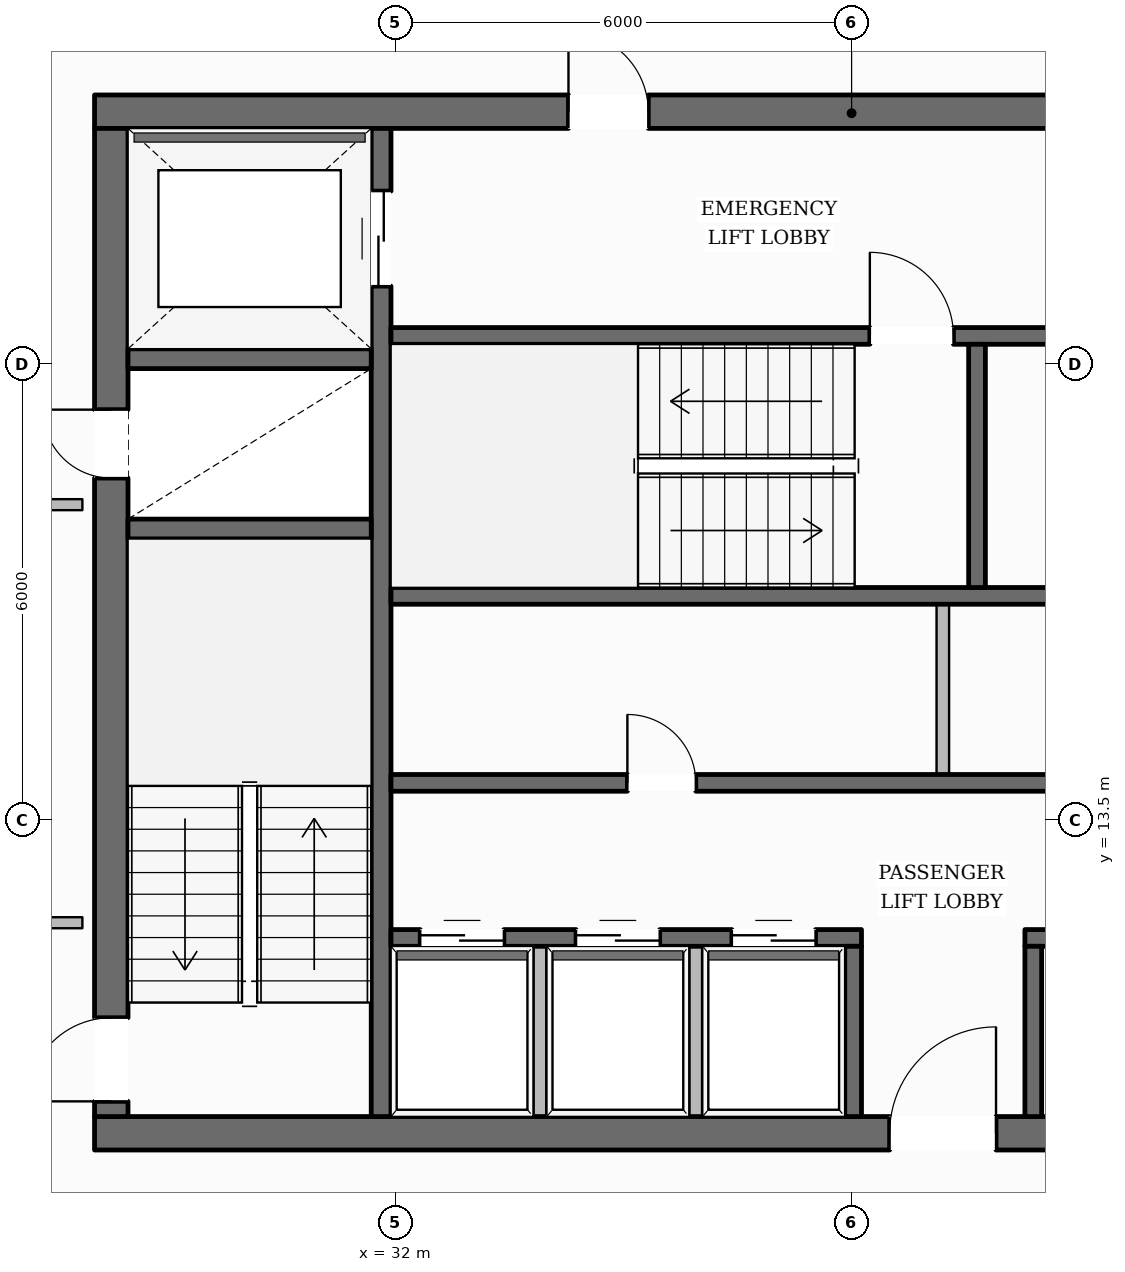
"""IFC4 building model, lengths in metres.
Left out: names, types, materials, properties, quantities, classifications, styles, units other than length and angle.
Written with IfcOpenShell. Run it as: python <this file> out.ifc"""

import sys

from ifc_helpers import new_model, si_unit, direction, frame, frame_2d, origin, place, context, subcontext, project, spatial, rectangle, extrude, element, fill, save


model = new_model("IFC4")
c1 = context("Model", 3, precision=1e-05, world=origin(), true_north=direction((0.0, 1.0)))
c2 = subcontext(c1, "Body", "Model", "MODEL_VIEW")
j1 = project(units=[si_unit("LENGTHUNIT", "METRE"), si_unit("PLANEANGLEUNIT", "RADIAN")], contexts=[c1])
p1 = place(None, origin())
s1 = spatial("IfcSite", under=j1, at=p1, CompositionType="ELEMENT")
p2 = place(p1, origin())
s2 = spatial("IfcBuilding", under=s1, at=p2, CompositionType="ELEMENT")
p3 = place(p2, frame((0.0, 0.0, 211.2)))
s3 = spatial("IfcBuildingStorey", under=s2, at=p3, CompositionType="ELEMENT", Elevation=211.2)
p4 = place(p3, frame((28.04, 9.38, 0.0), z_axis=(0.0, 0.0, 1.0), x_axis=(1.0, 0.0, 0.0)))
e1 = element("IfcWall", 1, at=p4, inside=s3, PredefinedType="SOLIDWALL", context=c2, shape_type="SweptSolid", body=[
    extrude(rectangle(XDim=19.92, YDim=0.44, at=frame_2d((9.96, 0.0))), origin(), (0.0, 0.0, 1.0), 3.6),
])
p5 = place(p4, frame((10.46, 0.0, 0.0)))
e2 = element("IfcOpeningElement", 2, at=p5, cuts=e1, PredefinedType="OPENING", context=c2, shape_type="SweptSolid", body=[
    extrude(rectangle(XDim=1.4, YDim=2.2, at=frame_2d((0.7, 1.1))), frame((0.0, 0.23, 0.0), z_axis=(0.0, -1.0, 0.0), x_axis=(1.0, 0.0, 0.0)), (0.0, 0.0, 1.0), 0.46),
])
p6 = place(p3, frame((28.04, 22.82, 0.0), z_axis=(0.0, 0.0, 1.0), x_axis=(1.0, 0.0, 0.0)))
e3 = element("IfcWall", 3, at=p6, inside=s3, PredefinedType="SOLIDWALL", context=c2, shape_type="SweptSolid", body=[
    extrude(rectangle(XDim=19.92, YDim=0.44, at=frame_2d((9.96, 0.0))), origin(), (0.0, 0.0, 1.0), 3.6),
])
p7 = place(p6, frame((6.235, 0.0, 0.0)))
e4 = element("IfcOpeningElement", 4, at=p7, cuts=e3, PredefinedType="OPENING", context=c2, shape_type="SweptSolid", body=[
    extrude(rectangle(XDim=1.05, YDim=2.15, at=frame_2d((0.525, 1.075))), frame((0.0, 0.23, 0.0), z_axis=(0.0, -1.0, 0.0), x_axis=(1.0, 0.0, 0.0)), (0.0, 0.0, 1.0), 0.46),
])
p8 = place(p6, frame((12.635, 0.0, 0.0)))
e5 = element("IfcOpeningElement", 5, at=p8, cuts=e3, PredefinedType="OPENING", context=c2, shape_type="SweptSolid", body=[
    extrude(rectangle(XDim=1.05, YDim=2.15, at=frame_2d((0.525, 1.075))), frame((0.0, 0.23, 0.0), z_axis=(0.0, -1.0, 0.0), x_axis=(1.0, 0.0, 0.0)), (0.0, 0.0, 1.0), 0.46),
])
p9 = place(p3, frame((28.26, 9.6, 0.0), z_axis=(0.0, 0.0, 1.0), x_axis=(0.0, 1.0, 0.0)))
e6 = element("IfcWall", 6, at=p9, inside=s3, PredefinedType="SOLIDWALL", context=c2, shape_type="SweptSolid", body=[
    extrude(rectangle(XDim=13.0, YDim=0.44, at=frame_2d((6.5, 0.0))), origin(), (0.0, 0.0, 1.0), 3.6),
])
p10 = place(p9, frame((0.2, 0.0, 0.0)))
e7 = element("IfcOpeningElement", 7, at=p10, cuts=e6, PredefinedType="OPENING", context=c2, shape_type="SweptSolid", body=[
    extrude(rectangle(XDim=1.1, YDim=2.15, at=frame_2d((0.55, 1.075))), frame((0.0, 0.23, 0.0), z_axis=(0.0, -1.0, 0.0), x_axis=(1.0, 0.0, 0.0)), (0.0, 0.0, 1.0), 0.46),
])
p11 = place(p9, frame((8.4, 0.0, 0.0)))
e8 = element("IfcOpeningElement", 8, at=p11, cuts=e6, PredefinedType="OPENING", context=c2, shape_type="SweptSolid", body=[
    extrude(rectangle(XDim=0.9, YDim=2.1, at=frame_2d((0.45, 1.05))), frame((0.0, 0.23, 0.0), z_axis=(0.0, -1.0, 0.0), x_axis=(1.0, 0.0, 0.0)), (0.0, 0.0, 1.0), 0.46),
])
p12 = place(p3, frame((31.81, 9.6, 0.0), z_axis=(0.0, 0.0, 1.0), x_axis=(0.0, 1.0, 0.0)))
e9 = element("IfcWall", 9, at=p12, inside=s3, PredefinedType="SHEAR", context=c2, shape_type="SweptSolid", body=[
    extrude(rectangle(XDim=13.0, YDim=0.26, at=frame_2d((6.5, 0.0))), origin(), (0.0, 0.0, 1.0), 3.6),
])
p13 = place(p12, frame((10.925, 0.0, 0.0)))
e10 = element("IfcOpeningElement", 10, at=p13, cuts=e9, PredefinedType="OPENING", context=c2, shape_type="SweptSolid", body=[
    extrude(rectangle(XDim=1.25, YDim=2.25, at=frame_2d((0.625, 1.125))), frame((0.0, 0.14, 0.0), z_axis=(0.0, -1.0, 0.0), x_axis=(1.0, 0.0, 0.0)), (0.0, 0.0, 1.0), 0.28),
])
for number, where, z_axis, x_axis in (
    (11, (28.48, 17.33, 0.0), (0.0, 0.0, 1.0), (1.0, 0.0, 0.0)),
    (12, (28.48, 19.57, 0.0), (0.0, 0.0, 1.0), (1.0, 0.0, 0.0)),
):
    element("IfcWall", number, at=place(p3, frame(where, z_axis=z_axis, x_axis=x_axis)), inside=s3, PredefinedType="SHEAR", context=c2, shape_type="SweptSolid", body=[
        extrude(rectangle(XDim=3.2, YDim=0.26, at=frame_2d((1.6, 0.0))), origin(), (0.0, 0.0, 1.0), 3.6),
    ])
p14 = place(p3, frame((31.94, 19.87, 0.0), z_axis=(0.0, 0.0, 1.0), x_axis=(1.0, 0.0, 0.0)))
e13 = element("IfcWall", 13, at=p14, inside=s3, PredefinedType="SOLIDWALL", context=c2, shape_type="SweptSolid", body=[
    extrude(rectangle(XDim=12.12, YDim=0.22, at=frame_2d((6.06, 0.0))), origin(), (0.0, 0.0, 1.0), 3.6),
])
p15 = place(p14, frame((6.3, 0.0, 0.0)))
e14 = element("IfcOpeningElement", 14, at=p15, cuts=e13, PredefinedType="OPENING", context=c2, shape_type="SweptSolid", body=[
    extrude(rectangle(XDim=1.1, YDim=2.15, at=frame_2d((0.55, 1.075))), frame((0.0, 0.12, 0.0), z_axis=(0.0, -1.0, 0.0), x_axis=(1.0, 0.0, 0.0)), (0.0, 0.0, 1.0), 0.24),
])
p16 = place(p14, frame((9.51, 0.0, 0.0)))
e15 = element("IfcOpeningElement", 15, at=p16, cuts=e13, PredefinedType="OPENING", context=c2, shape_type="SweptSolid", body=[
    extrude(rectangle(XDim=0.9, YDim=2.1, at=frame_2d((0.45, 1.05))), frame((0.0, 0.12, 0.0), z_axis=(0.0, -1.0, 0.0), x_axis=(1.0, 0.0, 0.0)), (0.0, 0.0, 1.0), 0.24),
])
p17 = place(p3, frame((31.94, 16.45, 0.0), z_axis=(0.0, 0.0, 1.0), x_axis=(1.0, 0.0, 0.0)))
e16 = element("IfcWall", 16, at=p17, inside=s3, PredefinedType="SOLIDWALL", context=c2, shape_type="SweptSolid", body=[
    extrude(rectangle(XDim=12.12, YDim=0.22, at=frame_2d((6.06, 0.0))), origin(), (0.0, 0.0, 1.0), 3.6),
])
p18 = place(p3, frame((39.65, 16.56, 0.0), z_axis=(0.0, 0.0, 1.0), x_axis=(0.0, 1.0, 0.0)))
e17 = element("IfcWall", 17, at=p18, inside=s3, PredefinedType="SOLIDWALL", context=c2, shape_type="SweptSolid", body=[
    extrude(rectangle(XDim=3.2, YDim=0.22, at=frame_2d((1.6, 0.0))), origin(), (0.0, 0.0, 1.0), 3.6),
])
p19 = place(p3, frame((31.94, 13.99, 0.0), z_axis=(0.0, 0.0, 1.0), x_axis=(1.0, 0.0, 0.0)))
e18 = element("IfcWall", 18, at=p19, inside=s3, PredefinedType="SOLIDWALL", context=c2, shape_type="SweptSolid", body=[
    extrude(rectangle(XDim=12.12, YDim=0.22, at=frame_2d((6.06, 0.0))), origin(), (0.0, 0.0, 1.0), 3.6),
])
p20 = place(p19, frame((3.11, 0.0, 0.0)))
e19 = element("IfcOpeningElement", 19, at=p20, cuts=e18, PredefinedType="OPENING", context=c2, shape_type="SweptSolid", body=[
    extrude(rectangle(XDim=0.9, YDim=2.1, at=frame_2d((0.45, 1.05))), frame((0.0, 0.12, 0.0), z_axis=(0.0, -1.0, 0.0), x_axis=(1.0, 0.0, 0.0)), (0.0, 0.0, 1.0), 0.24),
])
p21 = place(p19, frame((9.21, 0.0, 0.0)))
e20 = element("IfcOpeningElement", 20, at=p21, cuts=e18, PredefinedType="OPENING", context=c2, shape_type="SweptSolid", body=[
    extrude(rectangle(XDim=0.9, YDim=2.1, at=frame_2d((0.45, 1.05))), frame((0.0, 0.12, 0.0), z_axis=(0.0, -1.0, 0.0), x_axis=(1.0, 0.0, 0.0)), (0.0, 0.0, 1.0), 0.24),
])
p22 = place(p3, frame((31.94, 11.95, 0.0), z_axis=(0.0, 0.0, 1.0), x_axis=(1.0, 0.0, 0.0)))
e21 = element("IfcWall", 21, at=p22, inside=s3, PredefinedType="SOLIDWALL", context=c2, shape_type="SweptSolid", body=[
    extrude(rectangle(XDim=6.19, YDim=0.22, at=frame_2d((3.095, 0.0))), origin(), (0.0, 0.0, 1.0), 3.6),
])
p23 = place(p22, frame((0.385, 0.0, 0.0)))
e22 = element("IfcOpeningElement", 22, at=p23, cuts=e21, PredefinedType="OPENING", context=c2, shape_type="SweptSolid", body=[
    extrude(rectangle(XDim=1.1, YDim=2.2, at=frame_2d((0.55, 1.1))), frame((0.0, 0.12, 0.0), z_axis=(0.0, -1.0, 0.0), x_axis=(1.0, 0.0, 0.0)), (0.0, 0.0, 1.0), 0.24),
])
p24 = place(p22, frame((2.435, 0.0, 0.0)))
e23 = element("IfcOpeningElement", 23, at=p24, cuts=e21, PredefinedType="OPENING", context=c2, shape_type="SweptSolid", body=[
    extrude(rectangle(XDim=1.1, YDim=2.2, at=frame_2d((0.55, 1.1))), frame((0.0, 0.12, 0.0), z_axis=(0.0, -1.0, 0.0), x_axis=(1.0, 0.0, 0.0)), (0.0, 0.0, 1.0), 0.24),
])
p25 = place(p22, frame((4.485, 0.0, 0.0)))
e24 = element("IfcOpeningElement", 24, at=p25, cuts=e21, PredefinedType="OPENING", context=c2, shape_type="SweptSolid", body=[
    extrude(rectangle(XDim=1.1, YDim=2.2, at=frame_2d((0.55, 1.1))), frame((0.0, 0.12, 0.0), z_axis=(0.0, -1.0, 0.0), x_axis=(1.0, 0.0, 0.0)), (0.0, 0.0, 1.0), 0.24),
])
p26 = place(p3, frame((40.28, 11.95, 0.0), z_axis=(0.0, 0.0, 1.0), x_axis=(1.0, 0.0, 0.0)))
e25 = element("IfcWall", 25, at=p26, inside=s3, PredefinedType="SOLIDWALL", context=c2, shape_type="SweptSolid", body=[
    extrude(rectangle(XDim=3.78, YDim=0.22, at=frame_2d((1.89, 0.0))), origin(), (0.0, 0.0, 1.0), 3.6),
])
p27 = place(p26, frame((0.62, 0.0, 0.0)))
e26 = element("IfcOpeningElement", 26, at=p27, cuts=e25, PredefinedType="OPENING", context=c2, shape_type="SweptSolid", body=[
    extrude(rectangle(XDim=0.9, YDim=2.1, at=frame_2d((0.45, 1.05))), frame((0.0, 0.12, 0.0), z_axis=(0.0, -1.0, 0.0), x_axis=(1.0, 0.0, 0.0)), (0.0, 0.0, 1.0), 0.24),
])
p28 = place(p26, frame((2.47, 0.0, 0.0)))
e27 = element("IfcOpeningElement", 27, at=p28, cuts=e25, PredefinedType="OPENING", context=c2, shape_type="SweptSolid", body=[
    extrude(rectangle(XDim=0.9, YDim=2.1, at=frame_2d((0.45, 1.05))), frame((0.0, 0.12, 0.0), z_axis=(0.0, -1.0, 0.0), x_axis=(1.0, 0.0, 0.0)), (0.0, 0.0, 1.0), 0.24),
])
for number, where, z_axis, x_axis in (
    (28, (38.02, 9.6, 0.0), (0.0, 0.0, 1.0), (0.0, 1.0, 0.0)),
    (29, (40.39, 9.6, 0.0), (0.0, 0.0, 1.0), (0.0, 1.0, 0.0)),
):
    element("IfcWall", number, at=place(p3, frame(where, z_axis=z_axis, x_axis=x_axis)), inside=s3, PredefinedType="SOLIDWALL", context=c2, shape_type="SweptSolid", body=[
        extrude(rectangle(XDim=2.24, YDim=0.22, at=frame_2d((1.12, 0.0))), origin(), (0.0, 0.0, 1.0), 3.6),
    ])
p29 = place(p3, frame((14.16, 10.888, 0.0), z_axis=(0.0, 0.0, 1.0), x_axis=(0.508058913236, 0.861322321017, 0.0)))
e30 = element("IfcWall", 30, at=p29, inside=s3, PredefinedType="STANDARD", context=c2, shape_type="SweptSolid", body=[
    extrude(rectangle(XDim=38.718, YDim=0.35, at=frame_2d((19.359, 0.0))), origin(), (0.0, 0.0, 1.0), 3.132),
])
p30 = place(p29, frame((34.374, 0.0, 0.65)))
e31 = element("IfcOpeningElement", 31, at=p30, cuts=e30, PredefinedType="OPENING", context=c2, shape_type="SweptSolid", body=[
    extrude(rectangle(XDim=1.45, YDim=1.75, at=frame_2d((0.725, 0.875))), frame((0.0, 0.185, 0.0), z_axis=(0.0, -1.0, 0.0), x_axis=(1.0, 0.0, 0.0)), (0.0, 0.0, 1.0), 0.37),
])
p31 = place(p29, frame((28.08, 0.0, 0.65)))
e32 = element("IfcOpeningElement", 32, at=p31, cuts=e30, PredefinedType="OPENING", context=c2, shape_type="SweptSolid", body=[
    extrude(rectangle(XDim=1.45, YDim=1.75, at=frame_2d((0.725, 0.875))), frame((0.0, 0.185, 0.0), z_axis=(0.0, -1.0, 0.0), x_axis=(1.0, 0.0, 0.0)), (0.0, 0.0, 1.0), 0.37),
])
p32 = place(p29, frame((15.491, 0.0, 0.65)))
e33 = element("IfcOpeningElement", 33, at=p32, cuts=e30, PredefinedType="OPENING", context=c2, shape_type="SweptSolid", body=[
    extrude(rectangle(XDim=1.45, YDim=1.75, at=frame_2d((0.725, 0.875))), frame((0.0, 0.185, 0.0), z_axis=(0.0, -1.0, 0.0), x_axis=(1.0, 0.0, 0.0)), (0.0, 0.0, 1.0), 0.37),
])
p33 = place(p29, frame((9.197, 0.0, 0.65)))
e34 = element("IfcOpeningElement", 34, at=p33, cuts=e30, PredefinedType="OPENING", context=c2, shape_type="SweptSolid", body=[
    extrude(rectangle(XDim=1.45, YDim=1.75, at=frame_2d((0.725, 0.875))), frame((0.0, 0.185, 0.0), z_axis=(0.0, -1.0, 0.0), x_axis=(1.0, 0.0, 0.0)), (0.0, 0.0, 1.0), 0.37),
])
p34 = place(p29, frame((2.903, 0.0, 0.65)))
e35 = element("IfcOpeningElement", 35, at=p34, cuts=e30, PredefinedType="OPENING", context=c2, shape_type="SweptSolid", body=[
    extrude(rectangle(XDim=1.45, YDim=1.75, at=frame_2d((0.725, 0.875))), frame((0.0, 0.185, 0.0), z_axis=(0.0, -1.0, 0.0), x_axis=(1.0, 0.0, 0.0)), (0.0, 0.0, 1.0), 0.37),
])
for number, where, z_axis, x_axis in (
    (36, (33.9, 9.52, 0.0), (0.0, 0.0, 1.0), (0.0, 1.0, 0.0)),
    (37, (35.95, 9.52, 0.0), (0.0, 0.0, 1.0), (0.0, 1.0, 0.0)),
):
    element("IfcWall", number, at=place(p3, frame(where, z_axis=z_axis, x_axis=x_axis)), inside=s3, PredefinedType="PARTITIONING", context=c2, shape_type="SweptSolid", body=[
        extrude(rectangle(XDim=2.32, YDim=0.165, at=frame_2d((1.16, 0.0))), origin(), (0.0, 0.0, 1.0), 3.6),
    ])
p35 = place(p3, frame((39.2, 14.1, 0.0), z_axis=(0.0, 0.0, 1.0), x_axis=(0.0, 1.0, 0.0)))
e38 = element("IfcWall", 38, at=p35, inside=s3, PredefinedType="PARTITIONING", context=c2, shape_type="SweptSolid", body=[
    extrude(rectangle(XDim=2.24, YDim=0.165, at=frame_2d((1.12, 0.0))), origin(), (0.0, 0.0, 1.0), 3.6),
])
for number, where, z_axis, x_axis in (
    (39, (27.88, 17.65, 0.0), (0.0, 0.0, 1.0), (-1.0, 0.0, 0.0)),
    (40, (26.06, 12.15, 0.0), (0.0, 0.0, 1.0), (1.0, 0.0, 0.0)),
):
    element("IfcWall", number, at=place(p3, frame(where, z_axis=z_axis, x_axis=x_axis)), inside=s3, PredefinedType="PARTITIONING", context=c2, shape_type="SweptSolid", body=[
        extrude(rectangle(XDim=1.82, YDim=0.145, at=frame_2d((0.91, 0.0))), origin(), (0.0, 0.0, 1.0), 3.6),
    ])
p36 = place(p10, origin())
e41 = element("IfcDoor", 41, at=p36, inside=s3, OperationType="SINGLE_SWING_LEFT", PredefinedType="DOOR", context=c2, shape_type="SweptSolid", body=[
    extrude(rectangle(XDim=1.1, YDim=2.15, at=frame_2d((0.55, 1.075))), frame((0.0, 0.025, 0.0), z_axis=(0.0, -1.0, 0.0), x_axis=(1.0, 0.0, 0.0)), (0.0, 0.0, 1.0), 0.05),
])
fill(e7, e41)
p37 = place(p15, origin())
e42 = element("IfcDoor", 42, at=p37, inside=s3, OperationType="SINGLE_SWING_LEFT", PredefinedType="DOOR", context=c2, shape_type="SweptSolid", body=[
    extrude(rectangle(XDim=1.1, YDim=2.15, at=frame_2d((0.55, 1.075))), frame((0.0, 0.025, 0.0), z_axis=(0.0, -1.0, 0.0), x_axis=(1.0, 0.0, 0.0)), (0.0, 0.0, 1.0), 0.05),
])
fill(e14, e42)
p38 = place(p11, origin())
e43 = element("IfcDoor", 43, at=p38, inside=s3, OperationType="SINGLE_SWING_RIGHT", PredefinedType="DOOR", context=c2, shape_type="SweptSolid", body=[
    extrude(rectangle(XDim=0.9, YDim=2.1, at=frame_2d((0.45, 1.05))), frame((0.0, 0.025, 0.0), z_axis=(0.0, -1.0, 0.0), x_axis=(1.0, 0.0, 0.0)), (0.0, 0.0, 1.0), 0.05),
])
fill(e8, e43)
p39 = place(p7, origin())
e44 = element("IfcDoor", 44, at=p39, inside=s3, OperationType="SINGLE_SWING_LEFT", PredefinedType="DOOR", context=c2, shape_type="SweptSolid", body=[
    extrude(rectangle(XDim=1.05, YDim=2.15, at=frame_2d((0.525, 1.075))), frame((0.0, 0.025, 0.0), z_axis=(0.0, -1.0, 0.0), x_axis=(1.0, 0.0, 0.0)), (0.0, 0.0, 1.0), 0.05),
])
fill(e4, e44)
p40 = place(p13, origin())
e45 = element("IfcDoor", 45, at=p40, inside=s3, OperationType="DOUBLE_DOOR_SLIDING", PredefinedType="DOOR", context=c2, shape_type="SweptSolid", body=[
    extrude(rectangle(XDim=1.25, YDim=2.25, at=frame_2d((0.625, 1.125))), frame((0.0, 0.025, 0.0), z_axis=(0.0, -1.0, 0.0), x_axis=(1.0, 0.0, 0.0)), (0.0, 0.0, 1.0), 0.05),
])
fill(e10, e45)
p41 = place(p5, origin())
e46 = element("IfcDoor", 46, at=p41, inside=s3, OperationType="SINGLE_SWING_RIGHT", PredefinedType="DOOR", context=c2, shape_type="SweptSolid", body=[
    extrude(rectangle(XDim=1.4, YDim=2.2, at=frame_2d((0.7, 1.1))), frame((0.0, 0.025, 0.0), z_axis=(0.0, -1.0, 0.0), x_axis=(1.0, 0.0, 0.0)), (0.0, 0.0, 1.0), 0.05),
])
fill(e2, e46)
p42 = place(p23, origin())
e47 = element("IfcDoor", 47, at=p42, inside=s3, OperationType="DOUBLE_DOOR_SLIDING", PredefinedType="DOOR", context=c2, shape_type="SweptSolid", body=[
    extrude(rectangle(XDim=1.1, YDim=2.2, at=frame_2d((0.55, 1.1))), frame((0.0, 0.025, 0.0), z_axis=(0.0, -1.0, 0.0), x_axis=(1.0, 0.0, 0.0)), (0.0, 0.0, 1.0), 0.05),
])
fill(e22, e47)
p43 = place(p24, origin())
e48 = element("IfcDoor", 48, at=p43, inside=s3, OperationType="DOUBLE_DOOR_SLIDING", PredefinedType="DOOR", context=c2, shape_type="SweptSolid", body=[
    extrude(rectangle(XDim=1.1, YDim=2.2, at=frame_2d((0.55, 1.1))), frame((0.0, 0.025, 0.0), z_axis=(0.0, -1.0, 0.0), x_axis=(1.0, 0.0, 0.0)), (0.0, 0.0, 1.0), 0.05),
])
fill(e23, e48)
p44 = place(p25, origin())
e49 = element("IfcDoor", 49, at=p44, inside=s3, OperationType="DOUBLE_DOOR_SLIDING", PredefinedType="DOOR", context=c2, shape_type="SweptSolid", body=[
    extrude(rectangle(XDim=1.1, YDim=2.2, at=frame_2d((0.55, 1.1))), frame((0.0, 0.025, 0.0), z_axis=(0.0, -1.0, 0.0), x_axis=(1.0, 0.0, 0.0)), (0.0, 0.0, 1.0), 0.05),
])
fill(e24, e49)
p45 = place(p20, origin())
e50 = element("IfcDoor", 50, at=p45, inside=s3, OperationType="SINGLE_SWING_LEFT", PredefinedType="DOOR", context=c2, shape_type="SweptSolid", body=[
    extrude(rectangle(XDim=0.9, YDim=2.1, at=frame_2d((0.45, 1.05))), frame((0.0, 0.025, 0.0), z_axis=(0.0, -1.0, 0.0), x_axis=(1.0, 0.0, 0.0)), (0.0, 0.0, 1.0), 0.05),
])
fill(e19, e50)
save(model, sys.argv[1])
